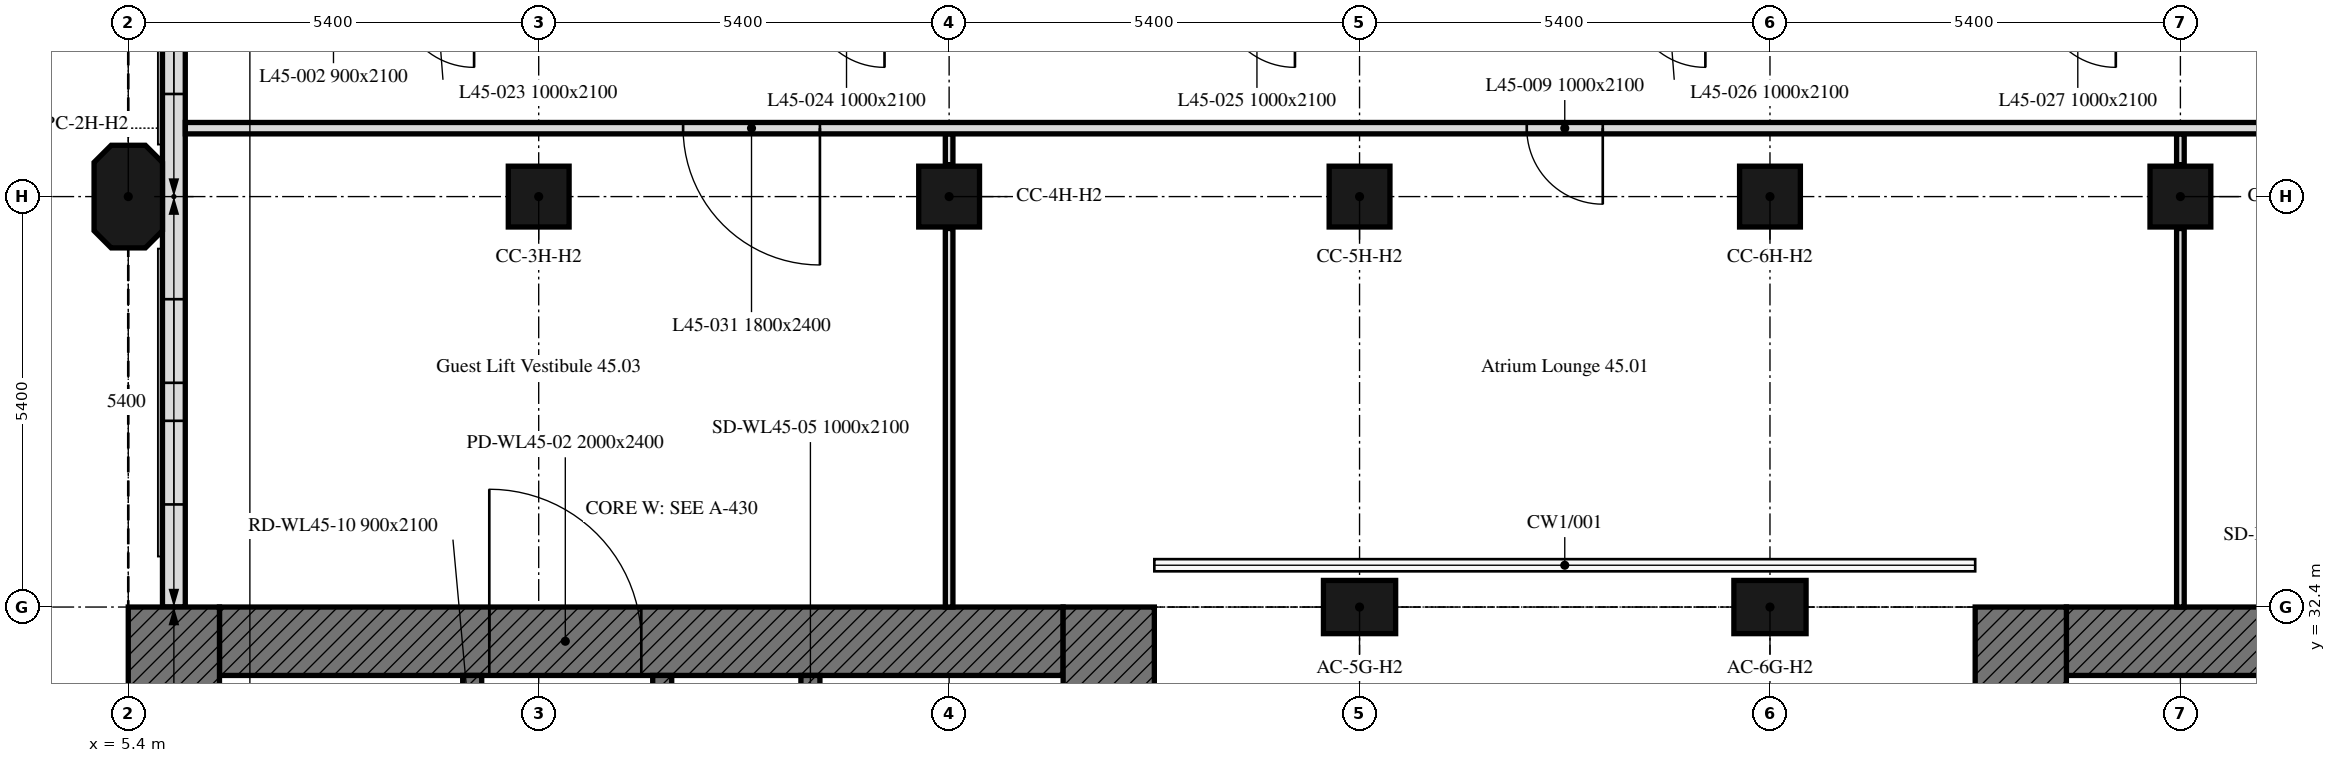
"""IFC4 building model, lengths in metres.
Left out: names, types, materials, properties, quantities, classifications, styles, units other than length and angle.
Written with IfcOpenShell. Run it as: python <this file> out.ifc"""

import sys

from ifc_helpers import new_model, si_unit, direction, frame, frame_2d, origin, origin_2d, place, context, subcontext, project, spatial, polyline, rectangle, outline, extrude, element, fill, save


model = new_model("IFC4")
c1 = context("Model", 3, precision=1e-05, world=origin(), true_north=direction((0.0, 1.0)))
c2 = subcontext(c1, "Body", "Model", "MODEL_VIEW")
j1 = project(units=[si_unit("LENGTHUNIT", "METRE"), si_unit("PLANEANGLEUNIT", "RADIAN")], contexts=[c1])
p1 = place(None, origin())
s1 = spatial("IfcSite", under=j1, at=p1, CompositionType="ELEMENT")
p2 = place(p1, origin())
s2 = spatial("IfcBuilding", under=s1, at=p2, CompositionType="ELEMENT")
p3 = place(p2, frame((0.0, 0.0, 187.3)))
s3 = spatial("IfcBuildingStorey", under=s2, at=p3, CompositionType="ELEMENT", Elevation=187.3)
for number, where, z_axis, x_axis in (
    (1, (21.6, 32.4, 0.0), (0.0, 0.0, 1.0), (1.0, 0.0, 0.0)),
    (2, (27.0, 32.4, 0.0), (0.0, 0.0, 1.0), (1.0, 0.0, 0.0)),
):
    element("IfcColumn", number, at=place(p3, frame(where, z_axis=z_axis, x_axis=x_axis)), inside=s3, PredefinedType="COLUMN", context=c2, shape_type="SweptSolid", body=[
        extrude(rectangle(XDim=0.95, YDim=0.7, at=origin_2d()), origin(), (0.0, 0.0, 1.0), 3.0),
    ])
p4 = place(p3, frame((5.4, 37.8, 0.0), z_axis=(0.0, 0.0, 1.0), x_axis=(0.0, 1.0, 0.0)))
e3 = element("IfcColumn", 3, at=p4, inside=s3, PredefinedType="COLUMN", context=c2, shape_type="SweptSolid", body=[
    extrude(outline(polyline([(-0.45, -0.45), (0.45, -0.45), (0.675, -0.225), (0.675, 0.225), (0.45, 0.45), (-0.45, 0.45), (-0.675, 0.225), (-0.675, -0.225), (-0.45, -0.45)])), origin(), (0.0, 0.0, 1.0), 3.0),
])
for number, where, z_axis, x_axis in (
    (4, (10.8, 37.8, 0.0), (0.0, 0.0, 1.0), (1.0, 0.0, 0.0)),
    (5, (16.2, 37.8, 0.0), (0.0, 0.0, 1.0), (1.0, 0.0, 0.0)),
    (6, (21.6, 37.8, 0.0), (0.0, 0.0, 1.0), (1.0, 0.0, 0.0)),
    (7, (27.0, 37.8, 0.0), (0.0, 0.0, 1.0), (1.0, 0.0, 0.0)),
    (8, (32.4, 37.8, 0.0), (0.0, 0.0, 1.0), (1.0, 0.0, 0.0)),
):
    element("IfcColumn", number, at=place(p3, frame(where, z_axis=z_axis, x_axis=x_axis)), inside=s3, PredefinedType="COLUMN", context=c2, shape_type="SweptSolid", body=[
        extrude(rectangle(XDim=0.8, YDim=0.8, at=origin_2d()), origin(), (0.0, 0.0, 1.0), 3.0),
    ])
p5 = place(p3, frame((6.0, 43.014, 0.0), z_axis=(0.0, 0.0, 1.0), x_axis=(0.0, -1.0, 0.0)))
e9 = element("IfcWall", 9, at=p5, inside=s3, PredefinedType="SOLIDWALL", context=c2, shape_type="SweptSolid", body=[
    extrude(rectangle(XDim=10.614, YDim=0.3, at=frame_2d((5.307, 0.0))), origin(), (0.0, 0.0, 1.0), 3.0),
])
p6 = place(p5, frame((1.164, 0.0, 0.9)))
e10 = element("IfcOpeningElement", 10, at=p6, cuts=e9, PredefinedType="OPENING", context=c2, shape_type="SweptSolid", body=[
    extrude(rectangle(XDim=1.1, YDim=1.7, at=frame_2d((0.55, 0.85))), frame((0.0, 0.16, 0.0), z_axis=(0.0, -1.0, 0.0), x_axis=(1.0, 0.0, 0.0)), (0.0, 0.0, 1.0), 0.32),
])
p7 = place(p5, frame((2.764, 0.0, 0.9)))
e11 = element("IfcOpeningElement", 11, at=p7, cuts=e9, PredefinedType="OPENING", context=c2, shape_type="SweptSolid", body=[
    extrude(rectangle(XDim=1.1, YDim=1.7, at=frame_2d((0.55, 0.85))), frame((0.0, 0.16, 0.0), z_axis=(0.0, -1.0, 0.0), x_axis=(1.0, 0.0, 0.0)), (0.0, 0.0, 1.0), 0.32),
])
p8 = place(p5, frame((6.564, 0.0, 0.9)))
e12 = element("IfcOpeningElement", 12, at=p8, cuts=e9, PredefinedType="OPENING", context=c2, shape_type="SweptSolid", body=[
    extrude(rectangle(XDim=1.1, YDim=1.7, at=frame_2d((0.55, 0.85))), frame((0.0, 0.16, 0.0), z_axis=(0.0, -1.0, 0.0), x_axis=(1.0, 0.0, 0.0)), (0.0, 0.0, 1.0), 0.32),
])
p9 = place(p5, frame((8.164, 0.0, 0.9)))
e13 = element("IfcOpeningElement", 13, at=p9, cuts=e9, PredefinedType="OPENING", context=c2, shape_type="SweptSolid", body=[
    extrude(rectangle(XDim=1.1, YDim=1.7, at=frame_2d((0.55, 0.85))), frame((0.0, 0.16, 0.0), z_axis=(0.0, -1.0, 0.0), x_axis=(1.0, 0.0, 0.0)), (0.0, 0.0, 1.0), 0.32),
])
p10 = place(p3, frame((6.6, 31.95, 0.0), z_axis=(0.0, 0.0, 1.0), x_axis=(1.0, 0.0, 0.0)))
e14 = element("IfcWall", 14, at=p10, inside=s3, PredefinedType="SOLIDWALL", context=c2, shape_type="SweptSolid", body=[
    extrude(rectangle(XDim=11.1, YDim=0.9, at=frame_2d((5.55, 0.0))), origin(), (0.0, 0.0, 1.0), 3.0),
])
p11 = place(p10, frame((3.55, 0.0, 0.0)))
e15 = element("IfcOpeningElement", 15, at=p11, cuts=e14, PredefinedType="OPENING", context=c2, shape_type="SweptSolid", body=[
    extrude(rectangle(XDim=2.0, YDim=2.4, at=frame_2d((1.0, 1.2))), frame((0.0, 0.45, 0.0), z_axis=(0.0, -1.0, 0.0), x_axis=(1.0, 0.0, 0.0)), (0.0, 0.0, 1.0), 0.9),
])
for number, where, z_axis, x_axis in (
    (16, (6.0, 16.2, 0.0), (0.0, 0.0, 1.0), (0.0, 1.0, 0.0)),
    (17, (18.3, 32.4, 0.0), (0.0, 0.0, 1.0), (0.0, -1.0, 0.0)),
):
    element("IfcWall", number, at=place(p3, frame(where, z_axis=z_axis, x_axis=x_axis)), inside=s3, PredefinedType="SOLIDWALL", context=c2, shape_type="SweptSolid", body=[
        extrude(rectangle(XDim=16.2, YDim=1.2, at=frame_2d((8.1, 0.0))), origin(), (0.0, 0.0, 1.0), 3.0),
    ])
p12 = place(p3, frame((9.925, 17.1, 0.0), z_axis=(0.0, 0.0, 1.0), x_axis=(0.0, 1.0, 0.0)))
e18 = element("IfcWall", 18, at=p12, inside=s3, PredefinedType="SOLIDWALL", context=c2, shape_type="SweptSolid", body=[
    extrude(rectangle(XDim=14.4, YDim=0.25, at=frame_2d((7.2, 0.0))), origin(), (0.0, 0.0, 1.0), 3.0),
])
p13 = place(p12, frame((4.6, 0.0, 0.0)))
e19 = element("IfcOpeningElement", 19, at=p13, cuts=e18, PredefinedType="OPENING", context=c2, shape_type="SweptSolid", body=[
    extrude(rectangle(XDim=1.0, YDim=2.1, at=frame_2d((0.5, 1.05))), frame((0.0, 0.125, 0.0), z_axis=(0.0, -1.0, 0.0), x_axis=(1.0, 0.0, 0.0)), (0.0, 0.0, 1.0), 0.25),
])
p14 = place(p12, frame((7.062, 0.0, 0.0)))
e20 = element("IfcOpeningElement", 20, at=p14, cuts=e18, PredefinedType="OPENING", context=c2, shape_type="SweptSolid", body=[
    extrude(rectangle(XDim=1.2, YDim=2.1, at=frame_2d((0.6, 1.05))), frame((0.0, 0.125, 0.0), z_axis=(0.0, -1.0, 0.0), x_axis=(1.0, 0.0, 0.0)), (0.0, 0.0, 1.0), 0.25),
])
p15 = place(p12, frame((10.36, 0.0, 0.0)))
e21 = element("IfcOpeningElement", 21, at=p15, cuts=e18, PredefinedType="OPENING", context=c2, shape_type="SweptSolid", body=[
    extrude(rectangle(XDim=0.9, YDim=2.1, at=frame_2d((0.45, 1.05))), frame((0.0, 0.125, 0.0), z_axis=(0.0, -1.0, 0.0), x_axis=(1.0, 0.0, 0.0)), (0.0, 0.0, 1.0), 0.25),
])
p16 = place(p12, frame((12.972, 0.0, 0.0)))
e22 = element("IfcOpeningElement", 22, at=p16, cuts=e18, PredefinedType="OPENING", context=c2, shape_type="SweptSolid", body=[
    extrude(rectangle(XDim=0.9, YDim=2.1, at=frame_2d((0.45, 1.05))), frame((0.0, 0.125, 0.0), z_axis=(0.0, -1.0, 0.0), x_axis=(1.0, 0.0, 0.0)), (0.0, 0.0, 1.0), 0.25),
])
p17 = place(p3, frame((14.375, 17.1, 0.0), z_axis=(0.0, 0.0, 1.0), x_axis=(0.0, 1.0, 0.0)))
e23 = element("IfcWall", 23, at=p17, inside=s3, PredefinedType="SOLIDWALL", context=c2, shape_type="SweptSolid", body=[
    extrude(rectangle(XDim=14.4, YDim=0.25, at=frame_2d((7.2, 0.0))), origin(), (0.0, 0.0, 1.0), 3.0),
])
p18 = place(p17, frame((13.15, 0.0, 0.0)))
e24 = element("IfcOpeningElement", 24, at=p18, cuts=e23, PredefinedType="OPENING", context=c2, shape_type="SweptSolid", body=[
    extrude(rectangle(XDim=1.0, YDim=2.1, at=frame_2d((0.5, 1.05))), frame((0.0, 0.125, 0.0), z_axis=(0.0, -1.0, 0.0), x_axis=(1.0, 0.0, 0.0)), (0.0, 0.0, 1.0), 0.25),
])
p19 = place(p17, frame((0.6, 0.0, 0.0)))
e25 = element("IfcOpeningElement", 25, at=p19, cuts=e23, PredefinedType="OPENING", context=c2, shape_type="SweptSolid", body=[
    extrude(rectangle(XDim=1.1, YDim=2.1, at=frame_2d((0.55, 1.05))), frame((0.0, 0.125, 0.0), z_axis=(0.0, -1.0, 0.0), x_axis=(1.0, 0.0, 0.0)), (0.0, 0.0, 1.0), 0.25),
])
p20 = place(p17, frame((3.25, 0.0, 0.0)))
e26 = element("IfcOpeningElement", 26, at=p20, cuts=e23, PredefinedType="OPENING", context=c2, shape_type="SweptSolid", body=[
    extrude(rectangle(XDim=0.9, YDim=2.1, at=frame_2d((0.45, 1.05))), frame((0.0, 0.125, 0.0), z_axis=(0.0, -1.0, 0.0), x_axis=(1.0, 0.0, 0.0)), (0.0, 0.0, 1.0), 0.25),
])
p21 = place(p3, frame((12.425, 29.4, 0.0), z_axis=(0.0, 0.0, 1.0), x_axis=(0.0, 1.0, 0.0)))
e27 = element("IfcWall", 27, at=p21, inside=s3, PredefinedType="SOLIDWALL", context=c2, shape_type="SweptSolid", body=[
    extrude(rectangle(XDim=2.1, YDim=0.25, at=frame_2d((1.05, 0.0))), origin(), (0.0, 0.0, 1.0), 3.0),
])
p22 = place(p21, frame((0.5, 0.0, 0.0)))
e28 = element("IfcOpeningElement", 28, at=p22, cuts=e27, PredefinedType="OPENING", context=c2, shape_type="SweptSolid", body=[
    extrude(rectangle(XDim=1.0, YDim=2.1, at=frame_2d((0.5, 1.05))), frame((0.0, 0.125, 0.0), z_axis=(0.0, -1.0, 0.0), x_axis=(1.0, 0.0, 0.0)), (0.0, 0.0, 1.0), 0.25),
])
p23 = place(p3, frame((30.9, 31.95, 0.0), z_axis=(0.0, 0.0, 1.0), x_axis=(1.0, 0.0, 0.0)))
e29 = element("IfcWall", 29, at=p23, inside=s3, PredefinedType="SOLIDWALL", context=c2, shape_type="SweptSolid", body=[
    extrude(rectangle(XDim=11.1, YDim=0.9, at=frame_2d((5.55, 0.0))), origin(), (0.0, 0.0, 1.0), 3.0),
])
p24 = place(p23, frame((5.55, 0.0, 0.0)))
e30 = element("IfcOpeningElement", 30, at=p24, cuts=e29, PredefinedType="OPENING", context=c2, shape_type="SweptSolid", body=[
    extrude(rectangle(XDim=2.0, YDim=2.4, at=frame_2d((1.0, 1.2))), frame((0.0, 0.45, 0.0), z_axis=(0.0, -1.0, 0.0), x_axis=(1.0, 0.0, 0.0)), (0.0, 0.0, 1.0), 0.9),
])
p25 = place(p3, frame((30.3, 16.2, 0.0), z_axis=(0.0, 0.0, 1.0), x_axis=(0.0, 1.0, 0.0)))
e31 = element("IfcWall", 31, at=p25, inside=s3, PredefinedType="SOLIDWALL", context=c2, shape_type="SweptSolid", body=[
    extrude(rectangle(XDim=16.2, YDim=1.2, at=frame_2d((8.1, 0.0))), origin(), (0.0, 0.0, 1.0), 3.0),
])
p26 = place(p3, frame((16.2, 38.625, 0.0), z_axis=(0.0, 0.0, 1.0), x_axis=(0.0, -1.0, 0.0)))
e32 = element("IfcWall", 32, at=p26, inside=s3, PredefinedType="PARTITIONING", context=c2, shape_type="SweptSolid", body=[
    extrude(rectangle(XDim=0.405, YDim=0.1, at=frame_2d((0.203, 0.0))), origin(), (0.0, 0.0, 1.0), 2.4),
])
for number, where, z_axis, x_axis in (
    (33, (16.2, 37.38, 0.0), (0.0, 0.0, 1.0), (0.0, -1.0, 0.0)),
    (34, (32.4, 32.4, 0.0), (0.0, 0.0, 1.0), (0.0, 1.0, 0.0)),
):
    element("IfcWall", number, at=place(p3, frame(where, z_axis=z_axis, x_axis=x_axis)), inside=s3, PredefinedType="PARTITIONING", context=c2, shape_type="SweptSolid", body=[
        extrude(rectangle(XDim=4.98, YDim=0.1, at=frame_2d((2.49, 0.0))), origin(), (0.0, 0.0, 1.0), 2.4),
    ])
p27 = place(p3, frame((32.4, 38.22, 0.0), z_axis=(0.0, 0.0, 1.0), x_axis=(0.0, 1.0, 0.0)))
e35 = element("IfcWall", 35, at=p27, inside=s3, PredefinedType="PARTITIONING", context=c2, shape_type="SweptSolid", body=[
    extrude(rectangle(XDim=0.405, YDim=0.1, at=frame_2d((0.203, 0.0))), origin(), (0.0, 0.0, 1.0), 2.4),
])
p28 = place(p3, frame((43.275, 38.7, 0.0), z_axis=(0.0, 0.0, 1.0), x_axis=(-1.0, 0.0, 0.0)))
e36 = element("IfcWall", 36, at=p28, inside=s3, PredefinedType="PARTITIONING", context=c2, shape_type="SweptSolid", body=[
    extrude(rectangle(XDim=37.124, YDim=0.15, at=frame_2d((18.562, 0.0))), origin(), (0.0, 0.0, 1.0), 2.4),
])
p29 = place(p28, frame((18.475, 0.0, 0.0)))
e37 = element("IfcOpeningElement", 37, at=p29, cuts=e36, PredefinedType="OPENING", context=c2, shape_type="SweptSolid", body=[
    extrude(rectangle(XDim=1.0, YDim=2.1, at=frame_2d((0.5, 1.05))), frame((0.0, 0.075, 0.0), z_axis=(0.0, -1.0, 0.0), x_axis=(1.0, 0.0, 0.0)), (0.0, 0.0, 1.0), 0.15),
])
p30 = place(p28, frame((28.775, 0.0, 0.0)))
e38 = element("IfcOpeningElement", 38, at=p30, cuts=e36, PredefinedType="OPENING", context=c2, shape_type="SweptSolid", body=[
    extrude(rectangle(XDim=1.8, YDim=2.4, at=frame_2d((0.9, 1.2))), frame((0.0, 0.075, 0.0), z_axis=(0.0, -1.0, 0.0), x_axis=(1.0, 0.0, 0.0)), (0.0, 0.0, 1.0), 0.15),
])
p31 = place(p28, frame((1.775, 0.0, 0.0)))
e39 = element("IfcOpeningElement", 39, at=p31, cuts=e36, PredefinedType="OPENING", context=c2, shape_type="SweptSolid", body=[
    extrude(rectangle(XDim=1.8, YDim=2.4, at=frame_2d((0.9, 1.2))), frame((0.0, 0.075, 0.0), z_axis=(0.0, -1.0, 0.0), x_axis=(1.0, 0.0, 0.0)), (0.0, 0.0, 1.0), 0.15),
])
p32 = place(p7, origin())
e40 = element("IfcWindow", 40, at=p32, inside=s3, PartitioningType="SINGLE_PANEL", PredefinedType="WINDOW", context=c2, shape_type="SweptSolid", body=[
    extrude(rectangle(XDim=1.1, YDim=1.7, at=frame_2d((0.55, 0.85))), frame((0.0, 0.03, 0.0), z_axis=(0.0, -1.0, 0.0), x_axis=(1.0, 0.0, 0.0)), (0.0, 0.0, 1.0), 0.06),
])
fill(e11, e40)
p33 = place(p8, origin())
e41 = element("IfcWindow", 41, at=p33, inside=s3, PartitioningType="SINGLE_PANEL", PredefinedType="WINDOW", context=c2, shape_type="SweptSolid", body=[
    extrude(rectangle(XDim=1.1, YDim=1.7, at=frame_2d((0.55, 0.85))), frame((0.0, 0.03, 0.0), z_axis=(0.0, -1.0, 0.0), x_axis=(1.0, 0.0, 0.0)), (0.0, 0.0, 1.0), 0.06),
])
fill(e12, e41)
p34 = place(p9, origin())
e42 = element("IfcWindow", 42, at=p34, inside=s3, PartitioningType="SINGLE_PANEL", PredefinedType="WINDOW", context=c2, shape_type="SweptSolid", body=[
    extrude(rectangle(XDim=1.1, YDim=1.7, at=frame_2d((0.55, 0.85))), frame((0.0, 0.03, 0.0), z_axis=(0.0, -1.0, 0.0), x_axis=(1.0, 0.0, 0.0)), (0.0, 0.0, 1.0), 0.06),
])
fill(e13, e42)
p35 = place(p11, origin())
e43 = element("IfcDoor", 43, at=p35, inside=s3, OperationType="DOUBLE_DOOR_SINGLE_SWING", PredefinedType="DOOR", context=c2, shape_type="SweptSolid", body=[
    extrude(rectangle(XDim=2.0, YDim=2.4, at=frame_2d((1.0, 1.2))), frame((0.0, 0.025, 0.0), z_axis=(0.0, -1.0, 0.0), x_axis=(1.0, 0.0, 0.0)), (0.0, 0.0, 1.0), 0.05),
])
fill(e15, e43)
p36 = place(p29, origin())
e44 = element("IfcDoor", 44, at=p36, inside=s3, OperationType="SINGLE_SWING_LEFT", PredefinedType="DOOR", context=c2, shape_type="SweptSolid", body=[
    extrude(rectangle(XDim=1.0, YDim=2.1, at=frame_2d((0.5, 1.05))), frame((0.0, 0.025, 0.0), z_axis=(0.0, -1.0, 0.0), x_axis=(1.0, 0.0, 0.0)), (0.0, 0.0, 1.0), 0.05),
])
fill(e37, e44)
p37 = place(p30, origin())
e45 = element("IfcDoor", 45, at=p37, inside=s3, OperationType="DOUBLE_DOOR_SINGLE_SWING", PredefinedType="DOOR", context=c2, shape_type="SweptSolid", body=[
    extrude(rectangle(XDim=1.8, YDim=2.4, at=frame_2d((0.9, 1.2))), frame((0.0, 0.025, 0.0), z_axis=(0.0, -1.0, 0.0), x_axis=(1.0, 0.0, 0.0)), (0.0, 0.0, 1.0), 0.05),
])
fill(e38, e45)
save(model, sys.argv[1])
